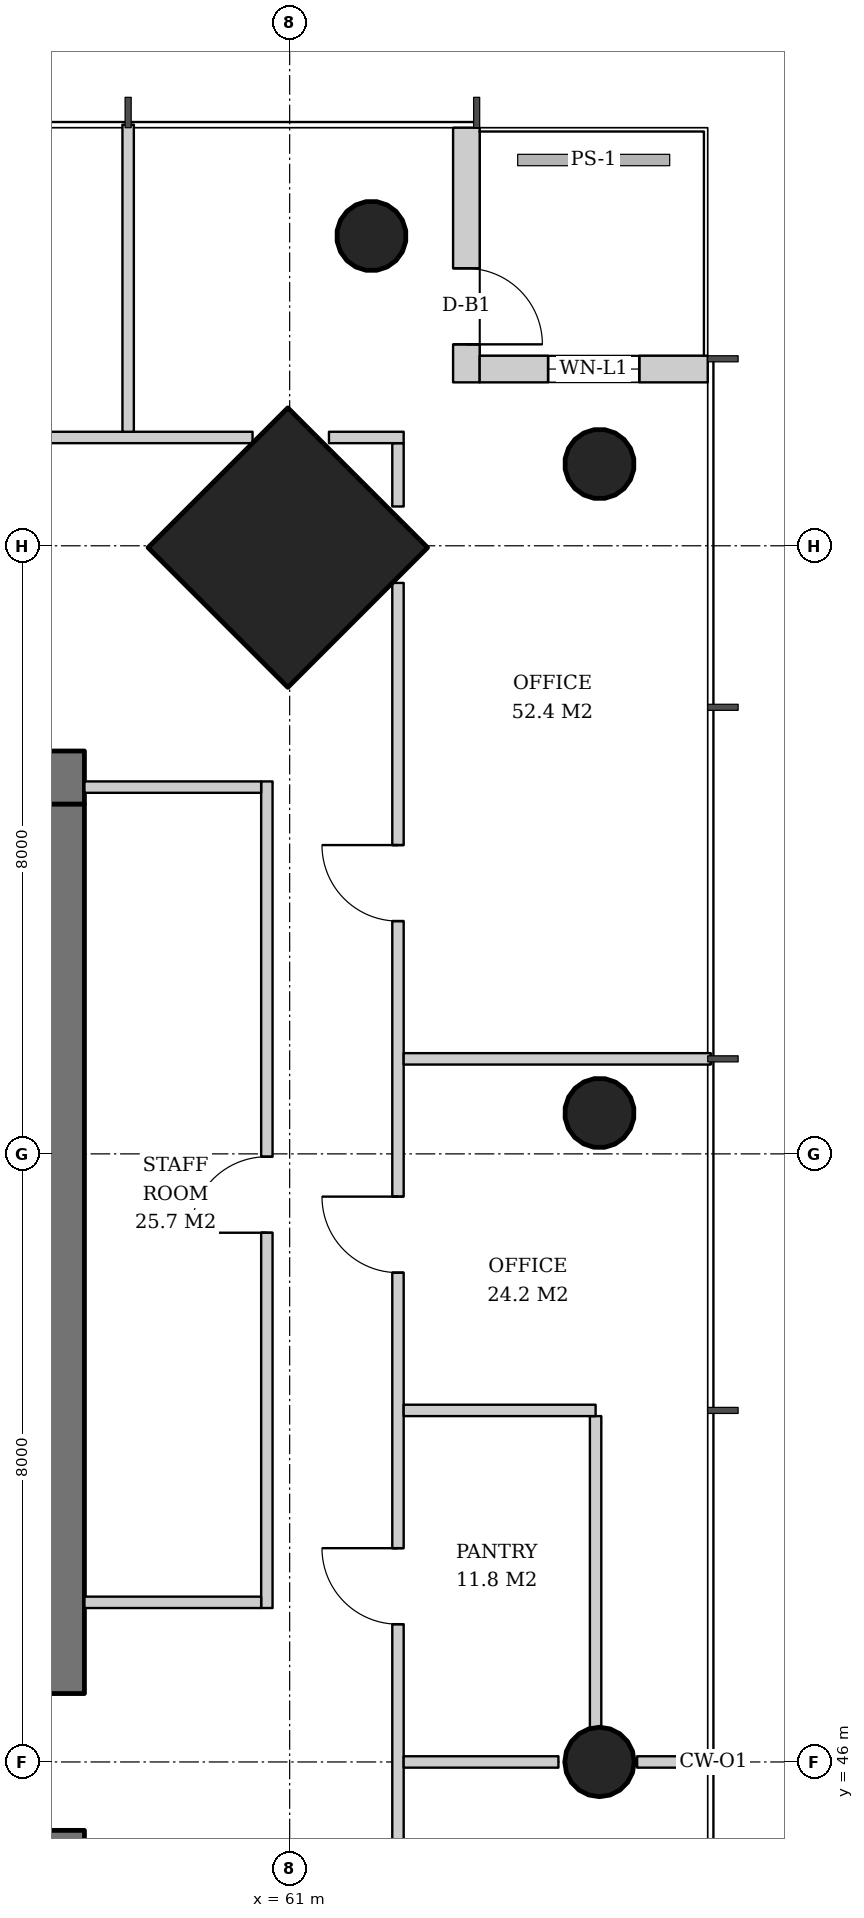
"""IFC4 building model, lengths in metres.
Left out: names, types, materials, properties, quantities, classifications, styles, units other than length and angle.
Written with IfcOpenShell. Run it as: python <this file> out.ifc"""

import sys

from ifc_helpers import new_model, si_unit, direction, frame, frame_2d, origin, origin_2d, place, context, subcontext, project, spatial, rectangle, hollow_circle, extrude, element, fill, save


model = new_model("IFC4")
c1 = context("Model", 3, precision=1e-05, world=origin(), true_north=direction((0.0, 1.0)))
c2 = subcontext(c1, "Body", "Model", "MODEL_VIEW")
j1 = project(units=[si_unit("LENGTHUNIT", "METRE"), si_unit("PLANEANGLEUNIT", "RADIAN")], contexts=[c1])
p1 = place(None, origin())
s1 = spatial("IfcSite", under=j1, at=p1, CompositionType="ELEMENT")
p2 = place(p1, origin())
s2 = spatial("IfcBuilding", under=s1, at=p2, CompositionType="ELEMENT")
p3 = place(p2, frame((0.0, 0.0, 142.6)))
s3 = spatial("IfcBuildingStorey", under=s2, at=p3, CompositionType="ELEMENT", Elevation=142.6)
p4 = place(p3, frame((61.014, 62.014, 0.0), z_axis=(-0.031964207655, -0.031964207655, 0.998977766949), x_axis=(0.707106781187, -0.707106781187, 0.0)))
e1 = element("IfcColumn", 1, at=p4, inside=s3, PredefinedType="COLUMN", context=c2, shape_type="SweptSolid", body=[
    extrude(rectangle(XDim=2.6, YDim=2.6, at=origin_2d()), origin(), (0.0, 0.0, 1.0), 3.804),
])
p5 = place(p3, frame((65.114, 63.114, 0.0), z_axis=(-0.031900153262, -0.031900153262, 0.998981861919), x_axis=(0.707106781187, -0.707106781187, 0.0)))
e2 = element("IfcColumn", 2, at=p5, inside=s3, PredefinedType="COLUMN", context=c2, shape_type="SweptSolid", body=[
    extrude(hollow_circle(Radius=0.457, WallThickness=0.03, at=origin_2d()), origin(), (0.0, 0.0, 1.0), 3.804),
])
p6 = place(p3, frame((65.114, 46.0, 0.0), z_axis=(-0.031916396774, 0.0, 0.999490542035), x_axis=(0.0, -1.0, 0.0)))
e3 = element("IfcColumn", 3, at=p6, inside=s3, PredefinedType="COLUMN", context=c2, shape_type="SweptSolid", body=[
    extrude(hollow_circle(Radius=0.457, WallThickness=0.03, at=origin_2d()), origin(), (0.0, 0.0, 1.0), 3.802),
])
p7 = place(p3, frame((65.114, 54.557, 0.0), z_axis=(-0.031912317206, -0.01598826355, 0.999362786699), x_axis=(0.447933021895, -0.894067115991, 0.0)))
e4 = element("IfcColumn", 4, at=p7, inside=s3, PredefinedType="COLUMN", context=c2, shape_type="SweptSolid", body=[
    extrude(hollow_circle(Radius=0.457, WallThickness=0.03, at=origin_2d()), origin(), (0.0, 0.0, 1.0), 3.802),
])
p8 = place(p3, frame((62.114, 66.114, 0.0), z_axis=(-0.031900153262, -0.031900153262, 0.998981861919), x_axis=(0.707106781187, -0.707106781187, 0.0)))
e5 = element("IfcColumn", 5, at=p8, inside=s3, PredefinedType="COLUMN", context=c2, shape_type="SweptSolid", body=[
    extrude(hollow_circle(Radius=0.457, WallThickness=0.03, at=origin_2d()), origin(), (0.0, 0.0, 1.0), 3.804),
])
p9 = place(p3, frame((31.7, 58.95, 0.0), z_axis=(0.0, 0.0, 1.0), x_axis=(1.0, 0.0, 0.0)))
e6 = element("IfcWall", 6, at=p9, inside=s3, PredefinedType="SHEAR", context=c2, shape_type="SweptSolid", body=[
    extrude(rectangle(XDim=26.6, YDim=0.7, at=frame_2d((13.3, 0.0))), origin(), (0.0, 0.0, 1.0), 3.8),
])
p10 = place(p9, frame((17.94, 0.0, 0.0)))
e7 = element("IfcOpeningElement", 7, at=p10, cuts=e6, PredefinedType="OPENING", context=c2, shape_type="SweptSolid", body=[
    extrude(rectangle(XDim=1.0, YDim=2.1, at=frame_2d((0.5, 1.05))), frame((0.0, 0.36, 0.0), z_axis=(0.0, -1.0, 0.0), x_axis=(1.0, 0.0, 0.0)), (0.0, 0.0, 1.0), 0.72),
])
p11 = place(p9, frame((5.825, 0.0, 0.0)))
e8 = element("IfcOpeningElement", 8, at=p11, cuts=e6, PredefinedType="OPENING", context=c2, shape_type="SweptSolid", body=[
    extrude(rectangle(XDim=1.0, YDim=2.1, at=frame_2d((0.5, 1.05))), frame((0.0, 0.36, 0.0), z_axis=(0.0, -1.0, 0.0), x_axis=(1.0, 0.0, 0.0)), (0.0, 0.0, 1.0), 0.72),
])
p12 = place(p9, frame((0.978, 0.0, 0.0)))
e9 = element("IfcOpeningElement", 9, at=p12, cuts=e6, PredefinedType="OPENING", context=c2, shape_type="SweptSolid", body=[
    extrude(rectangle(XDim=1.0, YDim=2.1, at=frame_2d((0.5, 1.05))), frame((0.0, 0.36, 0.0), z_axis=(0.0, -1.0, 0.0), x_axis=(1.0, 0.0, 0.0)), (0.0, 0.0, 1.0), 0.72),
])
p13 = place(p9, frame((2.587, 0.0, 0.0)))
e10 = element("IfcOpeningElement", 10, at=p13, cuts=e6, PredefinedType="OPENING", context=c2, shape_type="SweptSolid", body=[
    extrude(rectangle(XDim=1.0, YDim=2.1, at=frame_2d((0.5, 1.05))), frame((0.0, 0.36, 0.0), z_axis=(0.0, -1.0, 0.0), x_axis=(1.0, 0.0, 0.0)), (0.0, 0.0, 1.0), 0.72),
])
p14 = place(p9, frame((4.211, 0.0, 0.0)))
e11 = element("IfcOpeningElement", 11, at=p14, cuts=e6, PredefinedType="OPENING", context=c2, shape_type="SweptSolid", body=[
    extrude(rectangle(XDim=1.0, YDim=2.1, at=frame_2d((0.5, 1.05))), frame((0.0, 0.36, 0.0), z_axis=(0.0, -1.0, 0.0), x_axis=(1.0, 0.0, 0.0)), (0.0, 0.0, 1.0), 0.72),
])
p15 = place(p9, frame((8.44, 0.0, 0.0)))
e12 = element("IfcOpeningElement", 12, at=p15, cuts=e6, PredefinedType="OPENING", context=c2, shape_type="SweptSolid", body=[
    extrude(rectangle(XDim=1.0, YDim=2.1, at=frame_2d((0.5, 1.05))), frame((0.0, 0.36, 0.0), z_axis=(0.0, -1.0, 0.0), x_axis=(1.0, 0.0, 0.0)), (0.0, 0.0, 1.0), 0.72),
])
p16 = place(p9, frame((13.342, 0.0, 0.0)))
e13 = element("IfcOpeningElement", 13, at=p16, cuts=e6, PredefinedType="OPENING", context=c2, shape_type="SweptSolid", body=[
    extrude(rectangle(XDim=1.0, YDim=2.1, at=frame_2d((0.5, 1.05))), frame((0.0, 0.36, 0.0), z_axis=(0.0, -1.0, 0.0), x_axis=(1.0, 0.0, 0.0)), (0.0, 0.0, 1.0), 0.72),
])
p17 = place(p9, frame((22.4, 0.0, 0.0)))
e14 = element("IfcOpeningElement", 14, at=p17, cuts=e6, PredefinedType="OPENING", context=c2, shape_type="SweptSolid", body=[
    extrude(rectangle(XDim=1.0, YDim=2.1, at=frame_2d((0.5, 1.05))), frame((0.0, 0.36, 0.0), z_axis=(0.0, -1.0, 0.0), x_axis=(1.0, 0.0, 0.0)), (0.0, 0.0, 1.0), 0.72),
])
p18 = place(p3, frame((57.95, 33.4, 0.0), z_axis=(0.0, 0.0, 1.0), x_axis=(0.0, 1.0, 0.0)))
e15 = element("IfcWall", 15, at=p18, inside=s3, PredefinedType="SHEAR", context=c2, shape_type="SweptSolid", body=[
    extrude(rectangle(XDim=25.2, YDim=0.7, at=frame_2d((12.6, 0.0))), origin(), (0.0, 0.0, 1.0), 3.8),
])
p19 = place(p18, frame((11.7, 0.0, 0.0)))
e16 = element("IfcOpeningElement", 16, at=p19, cuts=e15, PredefinedType="OPENING", context=c2, shape_type="SweptSolid", body=[
    extrude(rectangle(XDim=1.8, YDim=2.4, at=frame_2d((0.9, 1.2))), frame((0.0, 0.36, 0.0), z_axis=(0.0, -1.0, 0.0), x_axis=(1.0, 0.0, 0.0)), (0.0, 0.0, 1.0), 0.72),
])
p20 = place(p3, frame((63.325, 67.5, 0.0), z_axis=(0.0, 0.0, 1.0), x_axis=(0.0, -1.0, 0.0)))
e17 = element("IfcWall", 17, at=p20, inside=s3, PredefinedType="SOLIDWALL", context=c2, shape_type="SweptSolid", body=[
    extrude(rectangle(XDim=3.35, YDim=0.35, at=frame_2d((1.675, 0.0))), origin(), (0.0, 0.0, 1.0), 3.62),
])
p21 = place(p20, frame((1.85, 0.0, 0.0)))
e18 = element("IfcOpeningElement", 18, at=p21, cuts=e17, PredefinedType="OPENING", context=c2, shape_type="SweptSolid", body=[
    extrude(rectangle(XDim=1.0, YDim=2.4, at=frame_2d((0.5, 1.2))), frame((0.0, 0.185, 0.0), z_axis=(0.0, -1.0, 0.0), x_axis=(1.0, 0.0, 0.0)), (0.0, 0.0, 1.0), 0.37),
])
p22 = place(p3, frame((63.5, 64.325, 0.0), z_axis=(0.0, 0.0, 1.0), x_axis=(1.0, 0.0, 0.0)))
e19 = element("IfcWall", 19, at=p22, inside=s3, PredefinedType="SOLIDWALL", context=c2, shape_type="SweptSolid", body=[
    extrude(rectangle(XDim=3.0, YDim=0.35, at=frame_2d((1.5, 0.0))), origin(), (0.0, 0.0, 1.0), 3.62),
])
p23 = place(p22, frame((0.9, 0.0, 0.6)))
e20 = element("IfcOpeningElement", 20, at=p23, cuts=e19, PredefinedType="OPENING", context=c2, shape_type="SweptSolid", body=[
    extrude(rectangle(XDim=1.2, YDim=2.55, at=frame_2d((0.6, 1.275))), frame((0.0, 0.185, 0.0), z_axis=(0.0, -1.0, 0.0), x_axis=(1.0, 0.0, 0.0)), (0.0, 0.0, 1.0), 0.37),
])
p24 = place(p3, frame((60.7, 48.025, 0.0), z_axis=(0.0, 0.0, 1.0), x_axis=(0.0, 1.0, 0.0)))
e21 = element("IfcWall", 21, at=p24, inside=s3, PredefinedType="PARTITIONING", context=c2, shape_type="SweptSolid", body=[
    extrude(rectangle(XDim=10.875, YDim=0.15, at=frame_2d((5.438, 0.0))), origin(), (0.0, 0.0, 1.0), 2.806),
])
p25 = place(p24, frame((4.938, 0.0, 0.0)))
e22 = element("IfcOpeningElement", 22, at=p25, cuts=e21, PredefinedType="OPENING", context=c2, shape_type="SweptSolid", body=[
    extrude(rectangle(XDim=1.0, YDim=2.1, at=frame_2d((0.5, 1.05))), frame((0.0, 0.085, 0.0), z_axis=(0.0, -1.0, 0.0), x_axis=(1.0, 0.0, 0.0)), (0.0, 0.0, 1.0), 0.17),
])
for number, where, z_axis, x_axis in (
    (23, (58.3, 48.1, 0.0), (0.0, 0.0, 1.0), (1.0, 0.0, 0.0)),
    (24, (58.3, 58.825, 0.0), (0.0, 0.0, 1.0), (1.0, 0.0, 0.0)),
):
    element("IfcWall", number, at=place(p3, frame(where, z_axis=z_axis, x_axis=x_axis)), inside=s3, PredefinedType="PARTITIONING", context=c2, shape_type="SweptSolid", body=[
        extrude(rectangle(XDim=2.325, YDim=0.15, at=frame_2d((1.163, 0.0))), origin(), (0.0, 0.0, 1.0), 3.62),
    ])
p26 = place(p3, frame((65.025, 46.457, 0.0), z_axis=(0.0, 0.0, 1.0), x_axis=(0.0, 1.0, 0.0)))
e25 = element("IfcWall", 25, at=p26, inside=s3, PredefinedType="PARTITIONING", context=c2, shape_type="SweptSolid", body=[
    extrude(rectangle(XDim=4.093, YDim=0.15, at=frame_2d((2.046, 0.0))), origin(), (0.0, 0.0, 1.0), 2.82),
])
p27 = place(p3, frame((62.425, 30.489, 0.0), z_axis=(0.0, 0.0, 1.0), x_axis=(0.0, 1.0, 0.0)))
e26 = element("IfcWall", 26, at=p27, inside=s3, PredefinedType="PARTITIONING", context=c2, shape_type="SweptSolid", body=[
    extrude(rectangle(XDim=31.023, YDim=0.15, at=frame_2d((15.511, 0.0))), origin(), (0.0, 0.0, 1.0), 2.72),
])
p28 = place(p27, frame((3.449, 0.0, 0.0)))
e27 = element("IfcOpeningElement", 27, at=p28, cuts=e26, PredefinedType="OPENING", context=c2, shape_type="SweptSolid", body=[
    extrude(rectangle(XDim=1.0, YDim=2.1, at=frame_2d((0.5, 1.05))), frame((0.0, 0.085, 0.0), z_axis=(0.0, -1.0, 0.0), x_axis=(1.0, 0.0, 0.0)), (0.0, 0.0, 1.0), 0.17),
])
p29 = place(p27, frame((8.074, 0.0, 0.0)))
e28 = element("IfcOpeningElement", 28, at=p29, cuts=e26, PredefinedType="OPENING", context=c2, shape_type="SweptSolid", body=[
    extrude(rectangle(XDim=1.0, YDim=2.1, at=frame_2d((0.5, 1.05))), frame((0.0, 0.085, 0.0), z_axis=(0.0, -1.0, 0.0), x_axis=(1.0, 0.0, 0.0)), (0.0, 0.0, 1.0), 0.17),
])
p30 = place(p27, frame((12.699, 0.0, 0.0)))
e29 = element("IfcOpeningElement", 29, at=p30, cuts=e26, PredefinedType="OPENING", context=c2, shape_type="SweptSolid", body=[
    extrude(rectangle(XDim=1.0, YDim=2.1, at=frame_2d((0.5, 1.05))), frame((0.0, 0.085, 0.0), z_axis=(0.0, -1.0, 0.0), x_axis=(1.0, 0.0, 0.0)), (0.0, 0.0, 1.0), 0.17),
])
p31 = place(p27, frame((17.324, 0.0, 0.0)))
e30 = element("IfcOpeningElement", 30, at=p31, cuts=e26, PredefinedType="OPENING", context=c2, shape_type="SweptSolid", body=[
    extrude(rectangle(XDim=1.0, YDim=2.1, at=frame_2d((0.5, 1.05))), frame((0.0, 0.085, 0.0), z_axis=(0.0, -1.0, 0.0), x_axis=(1.0, 0.0, 0.0)), (0.0, 0.0, 1.0), 0.17),
])
p32 = place(p27, frame((21.949, 0.0, 0.0)))
e31 = element("IfcOpeningElement", 31, at=p32, cuts=e26, PredefinedType="OPENING", context=c2, shape_type="SweptSolid", body=[
    extrude(rectangle(XDim=1.0, YDim=2.1, at=frame_2d((0.5, 1.05))), frame((0.0, 0.085, 0.0), z_axis=(0.0, -1.0, 0.0), x_axis=(1.0, 0.0, 0.0)), (0.0, 0.0, 1.0), 0.17),
])
p33 = place(p27, frame((26.574, 0.0, 0.0)))
e32 = element("IfcOpeningElement", 32, at=p33, cuts=e26, PredefinedType="OPENING", context=c2, shape_type="SweptSolid", body=[
    extrude(rectangle(XDim=1.0, YDim=2.1, at=frame_2d((0.5, 1.05))), frame((0.0, 0.085, 0.0), z_axis=(0.0, -1.0, 0.0), x_axis=(1.0, 0.0, 0.0)), (0.0, 0.0, 1.0), 0.17),
])
p34 = place(p3, frame((62.425, 62.517, 0.0), z_axis=(0.0, 0.0, 1.0), x_axis=(0.0, 1.0, 0.0)))
e33 = element("IfcWall", 33, at=p34, inside=s3, PredefinedType="PARTITIONING", context=c2, shape_type="SweptSolid", body=[
    extrude(rectangle(XDim=0.833, YDim=0.15, at=frame_2d((0.417, 0.0))), origin(), (0.0, 0.0, 1.0), 3.32),
])
p35 = place(p3, frame((62.5, 46.0, 0.0), z_axis=(0.0, 0.0, 1.0), x_axis=(1.0, 0.0, 0.0)))
e34 = element("IfcWall", 34, at=p35, inside=s3, PredefinedType="PARTITIONING", context=c2, shape_type="SweptSolid", body=[
    extrude(rectangle(XDim=2.036, YDim=0.15, at=frame_2d((1.018, 0.0))), origin(), (0.0, 0.0, 1.0), 3.62),
])
p36 = place(p3, frame((65.571, 46.0, 0.0), z_axis=(0.0, 0.0, 1.0), x_axis=(1.0, 0.0, 0.0)))
e35 = element("IfcWall", 35, at=p36, inside=s3, PredefinedType="PARTITIONING", context=c2, shape_type="SweptSolid", body=[
    extrude(rectangle(XDim=0.969, YDim=0.15, at=frame_2d((0.484, 0.0))), origin(), (0.0, 0.0, 1.0), 3.62),
])
p37 = place(p3, frame((62.5, 50.625, 0.0), z_axis=(0.0, 0.0, 1.0), x_axis=(1.0, 0.0, 0.0)))
e36 = element("IfcWall", 36, at=p37, inside=s3, PredefinedType="PARTITIONING", context=c2, shape_type="SweptSolid", body=[
    extrude(rectangle(XDim=2.525, YDim=0.15, at=frame_2d((1.262, 0.0))), origin(), (0.0, 0.0, 1.0), 2.82),
])
p38 = place(p3, frame((62.5, 55.25, 0.0), z_axis=(0.0, 0.0, 1.0), x_axis=(1.0, 0.0, 0.0)))
e37 = element("IfcWall", 37, at=p38, inside=s3, PredefinedType="PARTITIONING", context=c2, shape_type="SweptSolid", body=[
    extrude(rectangle(XDim=4.04, YDim=0.15, at=frame_2d((2.02, 0.0))), origin(), (0.0, 0.0, 1.0), 2.82),
])
p39 = place(p3, frame((62.5, 63.425, 0.0), z_axis=(0.0, 0.0, 1.0), x_axis=(-1.0, 0.0, 0.0)))
e38 = element("IfcWall", 38, at=p39, inside=s3, PredefinedType="PARTITIONING", context=c2, shape_type="SweptSolid", body=[
    extrude(rectangle(XDim=0.983, YDim=0.15, at=frame_2d((0.491, 0.0))), origin(), (0.0, 0.0, 1.0), 3.32),
])
p40 = place(p3, frame((60.511, 63.425, 0.0), z_axis=(0.0, 0.0, 1.0), x_axis=(-1.0, 0.0, 0.0)))
e39 = element("IfcWall", 39, at=p40, inside=s3, PredefinedType="PARTITIONING", context=c2, shape_type="SweptSolid", body=[
    extrude(rectangle(XDim=31.023, YDim=0.15, at=frame_2d((15.511, 0.0))), origin(), (0.0, 0.0, 1.0), 2.72),
])
p41 = place(p40, frame((3.049, 0.0, 0.0)))
e40 = element("IfcOpeningElement", 40, at=p41, cuts=e39, PredefinedType="OPENING", context=c2, shape_type="SweptSolid", body=[
    extrude(rectangle(XDim=1.8, YDim=2.4, at=frame_2d((0.9, 1.2))), frame((0.0, 0.085, 0.0), z_axis=(0.0, -1.0, 0.0), x_axis=(1.0, 0.0, 0.0)), (0.0, 0.0, 1.0), 0.17),
])
p42 = place(p40, frame((7.674, 0.0, 0.0)))
e41 = element("IfcOpeningElement", 41, at=p42, cuts=e39, PredefinedType="OPENING", context=c2, shape_type="SweptSolid", body=[
    extrude(rectangle(XDim=1.8, YDim=2.4, at=frame_2d((0.9, 1.2))), frame((0.0, 0.085, 0.0), z_axis=(0.0, -1.0, 0.0), x_axis=(1.0, 0.0, 0.0)), (0.0, 0.0, 1.0), 0.17),
])
p43 = place(p3, frame((58.875, 63.5, 0.0), z_axis=(0.0, 0.0, 1.0), x_axis=(0.0, 1.0, 0.0)))
e42 = element("IfcWall", 42, at=p43, inside=s3, PredefinedType="PARTITIONING", context=c2, shape_type="SweptSolid", body=[
    extrude(rectangle(XDim=4.04, YDim=0.15, at=frame_2d((2.02, 0.0))), origin(), (0.0, 0.0, 1.0), 2.82),
])
p44 = place(p21, origin())
e43 = element("IfcDoor", 43, at=p44, inside=s3, OperationType="SINGLE_SWING_RIGHT", PredefinedType="DOOR", context=c2, shape_type="SweptSolid", body=[
    extrude(rectangle(XDim=1.0, YDim=2.4, at=frame_2d((0.5, 1.2))), frame((0.0, 0.025, 0.0), z_axis=(0.0, -1.0, 0.0), x_axis=(1.0, 0.0, 0.0)), (0.0, 0.0, 1.0), 0.05),
])
fill(e18, e43)
p45 = place(p23, origin())
e44 = element("IfcWindow", 44, at=p45, inside=s3, PartitioningType="SINGLE_PANEL", PredefinedType="WINDOW", context=c2, shape_type="SweptSolid", body=[
    extrude(rectangle(XDim=1.2, YDim=2.55, at=frame_2d((0.6, 1.275))), frame((0.0, 0.03, 0.0), z_axis=(0.0, -1.0, 0.0), x_axis=(1.0, 0.0, 0.0)), (0.0, 0.0, 1.0), 0.06),
])
fill(e20, e44)
p46 = place(p19, origin())
e45 = element("IfcDoor", 45, at=p46, inside=s3, OperationType="DOUBLE_DOOR_SINGLE_SWING", PredefinedType="DOOR", context=c2, shape_type="SweptSolid", body=[
    extrude(rectangle(XDim=1.8, YDim=2.4, at=frame_2d((0.9, 1.2))), frame((0.0, 0.025, 0.0), z_axis=(0.0, -1.0, 0.0), x_axis=(1.0, 0.0, 0.0)), (0.0, 0.0, 1.0), 0.05),
])
fill(e16, e45)
p47 = place(p25, origin())
e46 = element("IfcDoor", 46, at=p47, inside=s3, OperationType="SINGLE_SWING_LEFT", PredefinedType="DOOR", context=c2, shape_type="SweptSolid", body=[
    extrude(rectangle(XDim=1.0, YDim=2.1, at=frame_2d((0.5, 1.05))), frame((0.0, 0.025, 0.0), z_axis=(0.0, -1.0, 0.0), x_axis=(1.0, 0.0, 0.0)), (0.0, 0.0, 1.0), 0.05),
])
fill(e22, e46)
p48 = place(p31, origin())
e47 = element("IfcDoor", 47, at=p48, inside=s3, OperationType="SINGLE_SWING_RIGHT", PredefinedType="DOOR", context=c2, shape_type="SweptSolid", body=[
    extrude(rectangle(XDim=1.0, YDim=2.1, at=frame_2d((0.5, 1.05))), frame((0.0, 0.025, 0.0), z_axis=(0.0, -1.0, 0.0), x_axis=(1.0, 0.0, 0.0)), (0.0, 0.0, 1.0), 0.05),
])
fill(e30, e47)
p49 = place(p32, origin())
e48 = element("IfcDoor", 48, at=p49, inside=s3, OperationType="SINGLE_SWING_RIGHT", PredefinedType="DOOR", context=c2, shape_type="SweptSolid", body=[
    extrude(rectangle(XDim=1.0, YDim=2.1, at=frame_2d((0.5, 1.05))), frame((0.0, 0.025, 0.0), z_axis=(0.0, -1.0, 0.0), x_axis=(1.0, 0.0, 0.0)), (0.0, 0.0, 1.0), 0.05),
])
fill(e31, e48)
p50 = place(p33, origin())
e49 = element("IfcDoor", 49, at=p50, inside=s3, OperationType="SINGLE_SWING_RIGHT", PredefinedType="DOOR", context=c2, shape_type="SweptSolid", body=[
    extrude(rectangle(XDim=1.0, YDim=2.1, at=frame_2d((0.5, 1.05))), frame((0.0, 0.025, 0.0), z_axis=(0.0, -1.0, 0.0), x_axis=(1.0, 0.0, 0.0)), (0.0, 0.0, 1.0), 0.05),
])
fill(e32, e49)
save(model, sys.argv[1])
